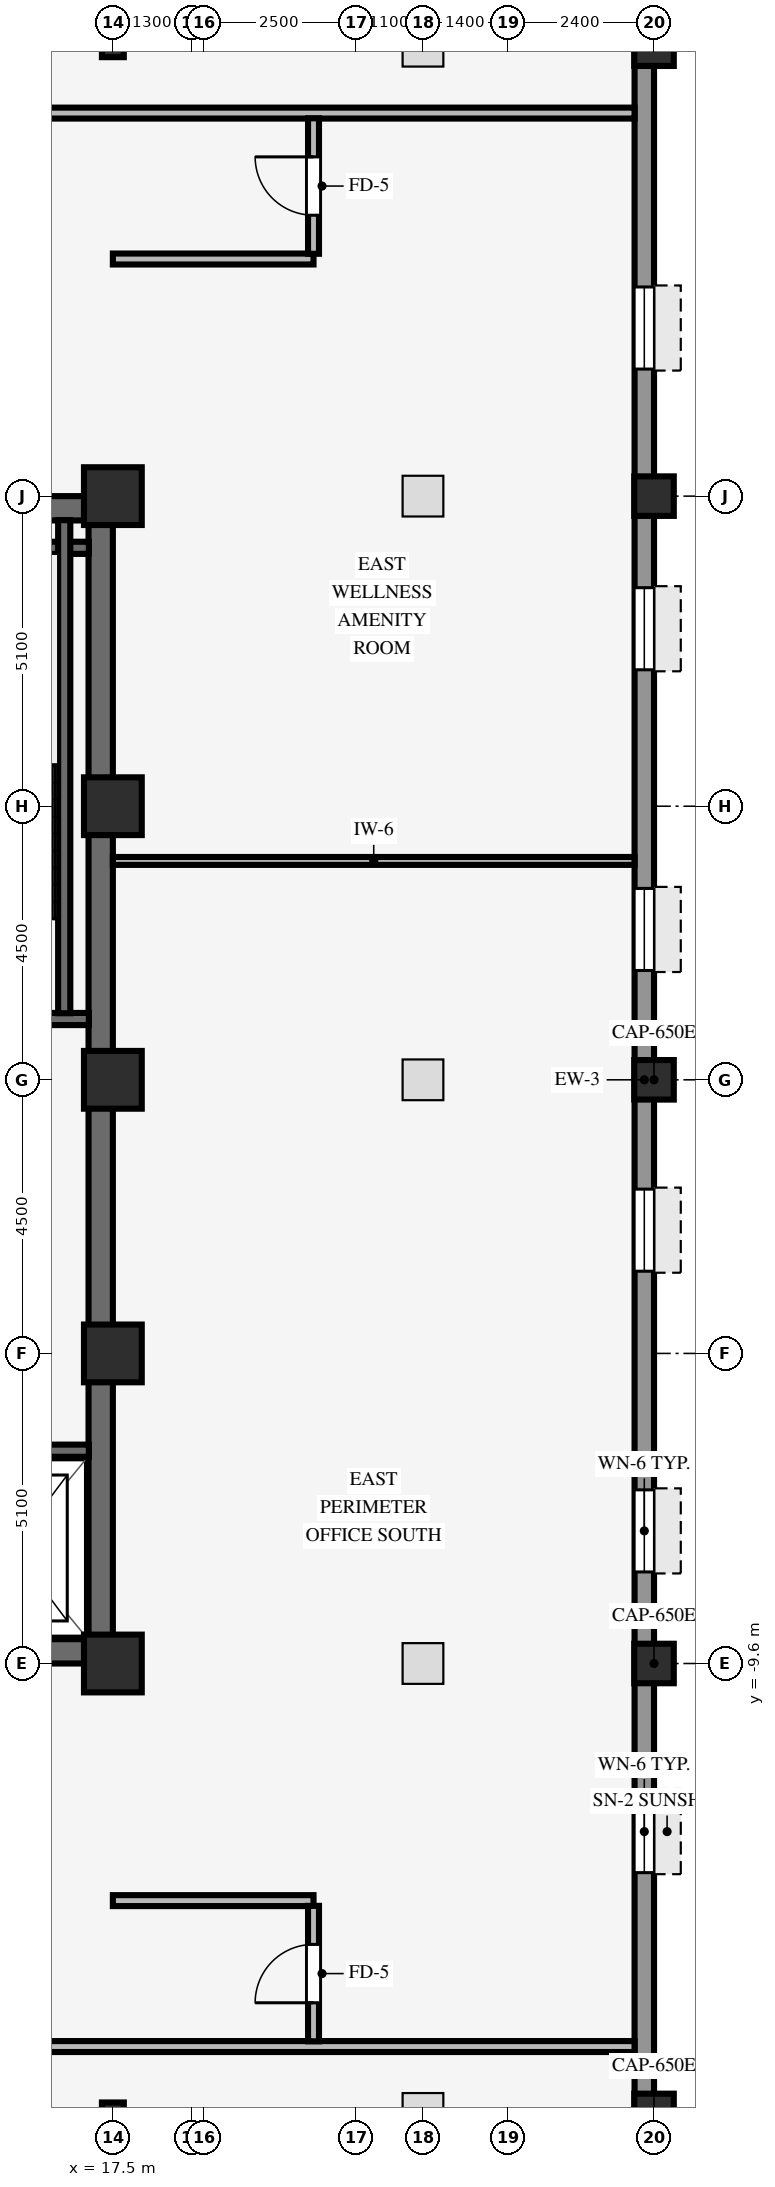
"""IFC4 building model, lengths in metres.
Left out: names, types, materials, properties, quantities, classifications, styles, units other than length and angle.
Written with IfcOpenShell. Run it as: python <this file> out.ifc"""

import sys

from ifc_helpers import new_model, si_unit, direction, frame, frame_2d, origin, origin_2d, place, context, subcontext, project, spatial, rectangle, hollow_rectangle, i_section, extrude, source, transform, mapped, element, fill, save


model = new_model("IFC4")
c1 = context("Model", 3, precision=1e-05, world=origin(), true_north=direction((0.0, 1.0)))
c2 = subcontext(c1, "Body", "Model", "MODEL_VIEW")
j1 = project(units=[si_unit("LENGTHUNIT", "METRE"), si_unit("PLANEANGLEUNIT", "RADIAN")], contexts=[c1])
p1 = place(None, origin())
s1 = spatial("IfcSite", under=j1, at=p1, CompositionType="ELEMENT")
p2 = place(p1, origin())
s2 = spatial("IfcBuilding", under=s1, at=p2, CompositionType="ELEMENT")
p3 = place(p2, frame((0.0, 0.0, 164.0)))
s3 = spatial("IfcBuildingStorey", under=s2, at=p3, CompositionType="ELEMENT", Elevation=164.0)
for number, where, z_axis, x_axis in (
    (1, (9.0, -9.4, 0.0), (0.0, 0.0, 1.0), (1.0, 0.0, 0.0)),
    (2, (9.0, 9.4, 0.0), (0.0, 0.0, 1.0), (1.0, 0.0, 0.0)),
):
    element("IfcWall", number, at=place(p3, frame(where, z_axis=z_axis, x_axis=x_axis)), inside=s3, PredefinedType="SHEAR", context=c2, shape_type="SweptSolid", body=[
        extrude(rectangle(XDim=8.5, YDim=0.4, at=frame_2d((4.25, 0.0))), origin(), (0.0, 0.0, 1.0), 3.25),
    ])
p4 = place(p3, frame((17.3, -9.205, 0.0), z_axis=(0.0, 0.0, 1.0), x_axis=(0.0, 1.0, 0.0)))
e3 = element("IfcWall", 3, at=p4, inside=s3, PredefinedType="SHEAR", context=c2, shape_type="SweptSolid", body=[
    extrude(rectangle(XDim=18.41, YDim=0.4, at=frame_2d((9.205, 0.0))), origin(), (0.0, 0.0, 1.0), 3.25),
])
for number, where, z_axis, x_axis in (
    (4, (17.5, -9.6, 0.0), (0.0, 0.0, 1.0), (1.0, 0.0, 0.0)),
    (5, (17.5, -4.5, 0.0), (0.0, 0.0, 1.0), (1.0, 0.0, 0.0)),
    (6, (17.5, 4.5, 0.0), (0.0, 0.0, 1.0), (1.0, 0.0, 0.0)),
    (7, (17.5, 9.6, 0.0), (0.0, 0.0, 1.0), (1.0, 0.0, 0.0)),
    (8, (17.5, 0.0, 0.0), (0.0, 0.0, 1.0), (1.0, 0.0, 0.0)),
):
    element("IfcColumn", number, at=place(p3, frame(where, z_axis=z_axis, x_axis=x_axis)), inside=s3, PredefinedType="COLUMN", context=c2, shape_type="SweptSolid", body=[
        extrude(rectangle(XDim=0.95, YDim=0.95, at=origin_2d()), origin(), (0.0, 0.0, 1.0), 3.25),
    ])
for number, where, z_axis, x_axis in (
    (9, (26.4, -17.0, 0.0), (0.0, 0.0, 1.0), (1.0, 0.0, 0.0)),
    (10, (26.4, -9.6, 0.0), (0.0, 0.0, 1.0), (1.0, 0.0, 0.0)),
    (11, (26.4, 0.0, 0.0), (0.0, 0.0, 1.0), (1.0, 0.0, 0.0)),
    (12, (26.4, 9.6, 0.0), (0.0, 0.0, 1.0), (1.0, 0.0, 0.0)),
    (13, (26.4, 17.0, 0.0), (0.0, 0.0, 1.0), (1.0, 0.0, 0.0)),
):
    element("IfcColumn", number, at=place(p3, frame(where, z_axis=z_axis, x_axis=x_axis)), inside=s3, PredefinedType="COLUMN", context=c2, shape_type="SweptSolid", body=[
        extrude(hollow_rectangle(XDim=0.65, YDim=0.65, WallThickness=0.04, InnerFilletRadius=0.04, OuterFilletRadius=0.08, at=origin_2d()), origin(), (0.0, 0.0, 1.0), 3.25),
    ])
for number, where, z_axis, x_axis in (
    (14, (17.5, -17.0, 0.0), (0.0, 0.0, 1.0), (1.0, 0.0, 0.0)),
    (15, (17.5, 17.0, 0.0), (0.0, 0.0, 1.0), (1.0, 0.0, 0.0)),
):
    element("IfcColumn", number, at=place(p3, frame(where, z_axis=z_axis, x_axis=x_axis)), inside=s3, PredefinedType="COLUMN", context=c2, shape_type="SweptSolid", body=[
        extrude(i_section(OverallWidth=0.36, OverallDepth=0.36, WebThickness=0.021, FlangeThickness=0.021, FilletRadius=0.018, at=origin_2d()), origin(), (0.0, 0.0, 1.0), 3.25),
    ])
p5 = place(p3, frame((26.24, -20.784, 0.0), z_axis=(0.0, 0.0, 1.0), x_axis=(0.0, 1.0, 0.0)))
e16 = element("IfcWall", 16, at=p5, inside=s3, PredefinedType="STANDARD", context=c2, shape_type="SweptSolid", body=[
    extrude(rectangle(XDim=41.568, YDim=0.32, at=frame_2d((20.784, 0.0))), origin(), (0.0, 0.0, 1.0), 3.24),
])
p6 = place(p5, frame((1.448, 0.0, 0.8)))
e17 = element("IfcOpeningElement", 17, at=p6, cuts=e16, PredefinedType="OPENING", context=c2, shape_type="SweptSolid", body=[
    extrude(rectangle(XDim=1.35, YDim=1.56, at=frame_2d((0.675, 0.78))), frame((0.0, 0.17, 0.0), z_axis=(0.0, -1.0, 0.0), x_axis=(1.0, 0.0, 0.0)), (0.0, 0.0, 1.0), 0.34),
])
p7 = place(p5, frame((7.744, 0.0, 0.8)))
e18 = element("IfcOpeningElement", 18, at=p7, cuts=e16, PredefinedType="OPENING", context=c2, shape_type="SweptSolid", body=[
    extrude(rectangle(XDim=1.35, YDim=1.56, at=frame_2d((0.675, 0.78))), frame((0.0, 0.17, 0.0), z_axis=(0.0, -1.0, 0.0), x_axis=(1.0, 0.0, 0.0)), (0.0, 0.0, 1.0), 0.34),
])
p8 = place(p5, frame((12.69, 0.0, 0.8)))
e19 = element("IfcOpeningElement", 19, at=p8, cuts=e16, PredefinedType="OPENING", context=c2, shape_type="SweptSolid", body=[
    extrude(rectangle(XDim=1.35, YDim=1.56, at=frame_2d((0.675, 0.78))), frame((0.0, 0.17, 0.0), z_axis=(0.0, -1.0, 0.0), x_axis=(1.0, 0.0, 0.0)), (0.0, 0.0, 1.0), 0.34),
])
p9 = place(p5, frame((17.636, 0.0, 0.8)))
e20 = element("IfcOpeningElement", 20, at=p9, cuts=e16, PredefinedType="OPENING", context=c2, shape_type="SweptSolid", body=[
    extrude(rectangle(XDim=1.35, YDim=1.56, at=frame_2d((0.675, 0.78))), frame((0.0, 0.17, 0.0), z_axis=(0.0, -1.0, 0.0), x_axis=(1.0, 0.0, 0.0)), (0.0, 0.0, 1.0), 0.34),
])
p10 = place(p5, frame((22.582, 0.0, 0.8)))
e21 = element("IfcOpeningElement", 21, at=p10, cuts=e16, PredefinedType="OPENING", context=c2, shape_type="SweptSolid", body=[
    extrude(rectangle(XDim=1.35, YDim=1.56, at=frame_2d((0.675, 0.78))), frame((0.0, 0.17, 0.0), z_axis=(0.0, -1.0, 0.0), x_axis=(1.0, 0.0, 0.0)), (0.0, 0.0, 1.0), 0.34),
])
p11 = place(p5, frame((27.528, 0.0, 0.8)))
e22 = element("IfcOpeningElement", 22, at=p11, cuts=e16, PredefinedType="OPENING", context=c2, shape_type="SweptSolid", body=[
    extrude(rectangle(XDim=1.35, YDim=1.56, at=frame_2d((0.675, 0.78))), frame((0.0, 0.17, 0.0), z_axis=(0.0, -1.0, 0.0), x_axis=(1.0, 0.0, 0.0)), (0.0, 0.0, 1.0), 0.34),
])
p12 = place(p5, frame((32.474, 0.0, 0.8)))
e23 = element("IfcOpeningElement", 23, at=p12, cuts=e16, PredefinedType="OPENING", context=c2, shape_type="SweptSolid", body=[
    extrude(rectangle(XDim=1.35, YDim=1.56, at=frame_2d((0.675, 0.78))), frame((0.0, 0.17, 0.0), z_axis=(0.0, -1.0, 0.0), x_axis=(1.0, 0.0, 0.0)), (0.0, 0.0, 1.0), 0.34),
])
p13 = place(p5, frame((38.77, 0.0, 0.8)))
e24 = element("IfcOpeningElement", 24, at=p13, cuts=e16, PredefinedType="OPENING", context=c2, shape_type="SweptSolid", body=[
    extrude(rectangle(XDim=1.35, YDim=1.56, at=frame_2d((0.675, 0.78))), frame((0.0, 0.17, 0.0), z_axis=(0.0, -1.0, 0.0), x_axis=(1.0, 0.0, 0.0)), (0.0, 0.0, 1.0), 0.34),
])
for number, where, z_axis, x_axis in (
    (25, (13.535, 1.0, 0.0), (0.0, 0.0, 1.0), (1.0, 0.0, 0.0)),
    (26, (13.535, 8.75, 0.0), (0.0, 0.0, 1.0), (1.0, 0.0, 0.0)),
):
    element("IfcWall", number, at=place(p3, frame(where, z_axis=z_axis, x_axis=x_axis)), inside=s3, PredefinedType="SHEAR", context=c2, shape_type="SweptSolid", body=[
        extrude(rectangle(XDim=3.57, YDim=0.2, at=frame_2d((1.785, 0.0))), origin(), (0.0, 0.0, 1.0), 3.25),
    ])
p14 = place(p3, frame((16.7, 1.095, 0.0), z_axis=(0.0, 0.0, 1.0), x_axis=(0.0, 1.0, 0.0)))
e27 = element("IfcWall", 27, at=p14, inside=s3, PredefinedType="SHEAR", context=c2, shape_type="SweptSolid", body=[
    extrude(rectangle(XDim=8.11, YDim=0.2, at=frame_2d((4.055, 0.0))), origin(), (0.0, 0.0, 1.0), 3.25),
])
p15 = place(p3, frame((14.645, -6.1, 0.0), z_axis=(0.0, 0.0, 1.0), x_axis=(1.0, 0.0, 0.0)))
e28 = element("IfcWall", 28, at=p15, inside=s3, PredefinedType="SHEAR", context=c2, shape_type="SweptSolid", body=[
    extrude(rectangle(XDim=2.46, YDim=0.2, at=frame_2d((1.23, 0.0))), origin(), (0.0, 0.0, 1.0), 3.25),
])
p16 = place(p3, frame((-26.08, -15.9, 0.0), z_axis=(0.0, 0.0, 1.0), x_axis=(1.0, 0.0, 0.0)))
e29 = element("IfcWall", 29, at=p16, inside=s3, PredefinedType="PARTITIONING", context=c2, shape_type="SweptSolid", body=[
    extrude(rectangle(XDim=52.16, YDim=0.18, at=frame_2d((26.08, 0.0))), origin(), (0.0, 0.0, 1.0), 3.24),
])
p17 = place(p16, frame((41.35, 0.0, 0.0)))
e30 = element("IfcOpeningElement", 30, at=p17, cuts=e29, PredefinedType="OPENING", context=c2, shape_type="SweptSolid", body=[
    extrude(rectangle(XDim=0.96, YDim=2.1, at=frame_2d((0.48, 1.05))), frame((0.0, 0.1, 0.0), z_axis=(0.0, -1.0, 0.0), x_axis=(1.0, 0.0, 0.0)), (0.0, 0.0, 1.0), 0.2),
])
p18 = place(p16, frame((23.34, 0.0, 0.0)))
e31 = element("IfcOpeningElement", 31, at=p18, cuts=e29, PredefinedType="OPENING", context=c2, shape_type="SweptSolid", body=[
    extrude(rectangle(XDim=0.96, YDim=2.1, at=frame_2d((0.48, 1.05))), frame((0.0, 0.1, 0.0), z_axis=(0.0, -1.0, 0.0), x_axis=(1.0, 0.0, 0.0)), (0.0, 0.0, 1.0), 0.2),
])
p19 = place(p16, frame((14.4, 0.0, 0.0)))
e32 = element("IfcOpeningElement", 32, at=p19, cuts=e29, PredefinedType="OPENING", context=c2, shape_type="SweptSolid", body=[
    extrude(rectangle(XDim=0.96, YDim=2.1, at=frame_2d((0.48, 1.05))), frame((0.0, 0.1, 0.0), z_axis=(0.0, -1.0, 0.0), x_axis=(1.0, 0.0, 0.0)), (0.0, 0.0, 1.0), 0.2),
])
p20 = place(p16, frame((30.005, 0.0, 0.0)))
e33 = element("IfcOpeningElement", 33, at=p20, cuts=e29, PredefinedType="OPENING", context=c2, shape_type="SweptSolid", body=[
    extrude(rectangle(XDim=0.96, YDim=2.1, at=frame_2d((0.48, 1.05))), frame((0.0, 0.1, 0.0), z_axis=(0.0, -1.0, 0.0), x_axis=(1.0, 0.0, 0.0)), (0.0, 0.0, 1.0), 0.2),
])
p21 = place(p16, frame((6.65, 0.0, 0.0)))
e34 = element("IfcOpeningElement", 34, at=p21, cuts=e29, PredefinedType="OPENING", context=c2, shape_type="SweptSolid", body=[
    extrude(rectangle(XDim=0.96, YDim=2.1, at=frame_2d((0.48, 1.05))), frame((0.0, 0.1, 0.0), z_axis=(0.0, -1.0, 0.0), x_axis=(1.0, 0.0, 0.0)), (0.0, 0.0, 1.0), 0.2),
])
p22 = place(p3, frame((17.5, -13.5, 0.0), z_axis=(0.0, 0.0, 1.0), x_axis=(1.0, 0.0, 0.0)))
e35 = element("IfcWall", 35, at=p22, inside=s3, PredefinedType="PARTITIONING", context=c2, shape_type="SweptSolid", body=[
    extrude(rectangle(XDim=3.3, YDim=0.18, at=frame_2d((1.65, 0.0))), origin(), (0.0, 0.0, 1.0), 2.888),
])
p23 = place(p3, frame((17.5, 3.6, 0.0), z_axis=(0.0, 0.0, 1.0), x_axis=(1.0, 0.0, 0.0)))
e36 = element("IfcWall", 36, at=p23, inside=s3, PredefinedType="PARTITIONING", context=c2, shape_type="SweptSolid", body=[
    extrude(rectangle(XDim=8.58, YDim=0.13, at=frame_2d((4.29, 0.0))), origin(), (0.0, 0.0, 1.0), 3.24),
])
p24 = place(p3, frame((17.5, 13.5, 0.0), z_axis=(0.0, 0.0, 1.0), x_axis=(1.0, 0.0, 0.0)))
e37 = element("IfcWall", 37, at=p24, inside=s3, PredefinedType="PARTITIONING", context=c2, shape_type="SweptSolid", body=[
    extrude(rectangle(XDim=3.3, YDim=0.18, at=frame_2d((1.65, 0.0))), origin(), (0.0, 0.0, 1.0), 2.888),
])
p25 = place(p3, frame((-26.08, 15.9, 0.0), z_axis=(0.0, 0.0, 1.0), x_axis=(1.0, 0.0, 0.0)))
e38 = element("IfcWall", 38, at=p25, inside=s3, PredefinedType="PARTITIONING", context=c2, shape_type="SweptSolid", body=[
    extrude(rectangle(XDim=52.16, YDim=0.18, at=frame_2d((26.08, 0.0))), origin(), (0.0, 0.0, 1.0), 3.24),
])
p26 = place(p25, frame((24.5, 0.0, 0.0)))
e39 = element("IfcOpeningElement", 39, at=p26, cuts=e38, PredefinedType="OPENING", context=c2, shape_type="SweptSolid", body=[
    extrude(rectangle(XDim=0.96, YDim=2.1, at=frame_2d((0.48, 1.05))), frame((0.0, 0.1, 0.0), z_axis=(0.0, -1.0, 0.0), x_axis=(1.0, 0.0, 0.0)), (0.0, 0.0, 1.0), 0.2),
])
p27 = place(p25, frame((40.5, 0.0, 0.0)))
e40 = element("IfcOpeningElement", 40, at=p27, cuts=e38, PredefinedType="OPENING", context=c2, shape_type="SweptSolid", body=[
    extrude(rectangle(XDim=0.96, YDim=2.1, at=frame_2d((0.48, 1.05))), frame((0.0, 0.1, 0.0), z_axis=(0.0, -1.0, 0.0), x_axis=(1.0, 0.0, 0.0)), (0.0, 0.0, 1.0), 0.2),
])
p28 = place(p25, frame((13.16, 0.0, 0.0)))
e41 = element("IfcOpeningElement", 41, at=p28, cuts=e38, PredefinedType="OPENING", context=c2, shape_type="SweptSolid", body=[
    extrude(rectangle(XDim=0.96, YDim=2.1, at=frame_2d((0.48, 1.05))), frame((0.0, 0.1, 0.0), z_axis=(0.0, -1.0, 0.0), x_axis=(1.0, 0.0, 0.0)), (0.0, 0.0, 1.0), 0.2),
])
p29 = place(p25, frame((6.425, 0.0, 0.0)))
e42 = element("IfcOpeningElement", 42, at=p29, cuts=e38, PredefinedType="OPENING", context=c2, shape_type="SweptSolid", body=[
    extrude(rectangle(XDim=0.96, YDim=2.1, at=frame_2d((0.48, 1.05))), frame((0.0, 0.1, 0.0), z_axis=(0.0, -1.0, 0.0), x_axis=(1.0, 0.0, 0.0)), (0.0, 0.0, 1.0), 0.2),
])
p30 = place(p3, frame((20.8, -15.814, 0.0), z_axis=(0.0, 0.0, 1.0), x_axis=(0.0, 1.0, 0.0)))
e43 = element("IfcWall", 43, at=p30, inside=s3, PredefinedType="PARTITIONING", context=c2, shape_type="SweptSolid", body=[
    extrude(rectangle(XDim=2.228, YDim=0.18, at=frame_2d((1.114, 0.0))), origin(), (0.0, 0.0, 1.0), 3.24),
])
p31 = place(p30, frame((0.634, 0.0, 0.0)))
e44 = element("IfcOpeningElement", 44, at=p31, cuts=e43, PredefinedType="OPENING", context=c2, shape_type="SweptSolid", body=[
    extrude(rectangle(XDim=0.96, YDim=2.1, at=frame_2d((0.48, 1.05))), frame((0.0, 0.1, 0.0), z_axis=(0.0, -1.0, 0.0), x_axis=(1.0, 0.0, 0.0)), (0.0, 0.0, 1.0), 0.2),
])
p32 = place(p3, frame((20.8, 13.586, 0.0), z_axis=(0.0, 0.0, 1.0), x_axis=(0.0, 1.0, 0.0)))
e45 = element("IfcWall", 45, at=p32, inside=s3, PredefinedType="PARTITIONING", context=c2, shape_type="SweptSolid", body=[
    extrude(rectangle(XDim=2.228, YDim=0.18, at=frame_2d((1.114, 0.0))), origin(), (0.0, 0.0, 1.0), 3.24),
])
p33 = place(p32, frame((0.634, 0.0, 0.0)))
e46 = element("IfcOpeningElement", 46, at=p33, cuts=e45, PredefinedType="OPENING", context=c2, shape_type="SweptSolid", body=[
    extrude(rectangle(XDim=0.96, YDim=2.1, at=frame_2d((0.48, 1.05))), frame((0.0, 0.1, 0.0), z_axis=(0.0, -1.0, 0.0), x_axis=(1.0, 0.0, 0.0)), (0.0, 0.0, 1.0), 0.2),
])
m1 = source(origin(), c2, "Body", "SweptSolid", [
    extrude(rectangle(XDim=1.35, YDim=1.56, at=frame_2d((0.675, 0.78))), frame((0.0, 0.03, 0.0), z_axis=(0.0, -1.0, 0.0), x_axis=(1.0, 0.0, 0.0)), (0.0, 0.0, 1.0), 0.06),
])
p34 = place(p7, origin())
e47 = element("IfcWindow", 47, at=p34, inside=s3, PartitioningType="SINGLE_PANEL", PredefinedType="WINDOW", context=c2, shape_type="MappedRepresentation", body=[
    mapped(m1, transform((0.0, 0.0, 0.0), scale=1.0)),
])
fill(e18, e47)
p35 = place(p8, origin())
e48 = element("IfcWindow", 48, at=p35, inside=s3, PartitioningType="SINGLE_PANEL", PredefinedType="WINDOW", context=c2, shape_type="MappedRepresentation", body=[
    mapped(m1, transform((0.0, 0.0, 0.0), scale=1.0)),
])
fill(e19, e48)
p36 = place(p9, origin())
e49 = element("IfcWindow", 49, at=p36, inside=s3, PartitioningType="SINGLE_PANEL", PredefinedType="WINDOW", context=c2, shape_type="MappedRepresentation", body=[
    mapped(m1, transform((0.0, 0.0, 0.0), scale=1.0)),
])
fill(e20, e49)
p37 = place(p10, origin())
e50 = element("IfcWindow", 50, at=p37, inside=s3, PartitioningType="SINGLE_PANEL", PredefinedType="WINDOW", context=c2, shape_type="MappedRepresentation", body=[
    mapped(m1, transform((0.0, 0.0, 0.0), scale=1.0)),
])
fill(e21, e50)
p38 = place(p11, origin())
e51 = element("IfcWindow", 51, at=p38, inside=s3, PartitioningType="SINGLE_PANEL", PredefinedType="WINDOW", context=c2, shape_type="MappedRepresentation", body=[
    mapped(m1, transform((0.0, 0.0, 0.0), scale=1.0)),
])
fill(e22, e51)
p39 = place(p12, origin())
e52 = element("IfcWindow", 52, at=p39, inside=s3, PartitioningType="SINGLE_PANEL", PredefinedType="WINDOW", context=c2, shape_type="MappedRepresentation", body=[
    mapped(m1, transform((0.0, 0.0, 0.0), scale=1.0)),
])
fill(e23, e52)
m2 = source(origin(), c2, "Body", "SweptSolid", [
    extrude(rectangle(XDim=0.96, YDim=2.1, at=frame_2d((0.48, 1.05))), frame((0.0, 0.025, 0.0), z_axis=(0.0, -1.0, 0.0), x_axis=(1.0, 0.0, 0.0)), (0.0, 0.0, 1.0), 0.05),
])
p40 = place(p31, origin())
e53 = element("IfcDoor", 53, at=p40, inside=s3, OperationType="SINGLE_SWING_LEFT", PredefinedType="DOOR", context=c2, shape_type="MappedRepresentation", body=[
    mapped(m2, transform((0.0, 0.0, 0.0), scale=1.0)),
])
fill(e44, e53)
p41 = place(p33, origin())
e54 = element("IfcDoor", 54, at=p41, inside=s3, OperationType="SINGLE_SWING_RIGHT", PredefinedType="DOOR", context=c2, shape_type="MappedRepresentation", body=[
    mapped(m2, transform((0.0, 0.0, 0.0), scale=1.0)),
])
fill(e46, e54)
save(model, sys.argv[1])
